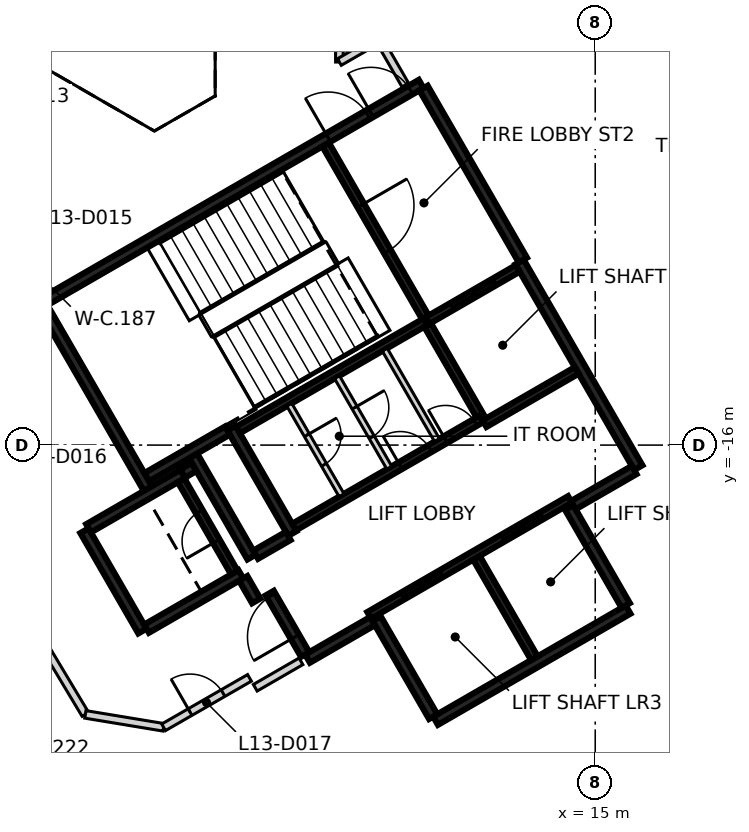
"""IFC4 building model, lengths in metres.
Left out: names, types, materials, properties, quantities, classifications, styles, units other than length and angle.
Written with IfcOpenShell. Run it as: python <this file> out.ifc"""

import sys

from ifc_helpers import new_model, si_unit, direction, frame, frame_2d, origin, place, context, subcontext, project, spatial, rectangle, extrude, element, fill, save


model = new_model("IFC4")
c1 = context("Model", 3, precision=1e-05, world=origin(), true_north=direction((0.0, 1.0)))
c2 = subcontext(c1, "Body", "Model", "MODEL_VIEW")
j1 = project(units=[si_unit("LENGTHUNIT", "METRE"), si_unit("PLANEANGLEUNIT", "RADIAN")], contexts=[c1])
p1 = place(None, origin())
s1 = spatial("IfcSite", under=j1, at=p1, CompositionType="ELEMENT")
p2 = place(p1, origin())
s2 = spatial("IfcBuilding", under=s1, at=p2, CompositionType="ELEMENT")
p3 = place(p2, frame((0.0, 0.0, 60.2)))
s3 = spatial("IfcBuildingStorey", under=s2, at=p3, CompositionType="ELEMENT", Elevation=60.2)
p4 = place(p3, frame((0.417, -12.273, 0.0), z_axis=(0.0, 0.0, 1.0), x_axis=(0.866021906294, 0.500006057782, 0.0)))
e1 = element("IfcWall", 1, at=p4, inside=s3, PredefinedType="SHEAR", context=c2, shape_type="SweptSolid", body=[
    extrude(rectangle(XDim=11.55, YDim=0.25, at=frame_2d((5.775, 0.0))), origin(), (0.0, 0.0, 1.0), 3.125),
])
p5 = place(p4, frame((10.025, 0.0, 0.0)))
e2 = element("IfcOpeningElement", 2, at=p5, cuts=e1, PredefinedType="OPENING", context=c2, shape_type="SweptSolid", body=[
    extrude(rectangle(XDim=1.2, YDim=2.1, at=frame_2d((0.6, 1.05))), frame((0.0, 0.135, 0.0), z_axis=(0.0, -1.0, 0.0), x_axis=(1.0, 0.0, 0.0)), (0.0, 0.0, 1.0), 0.27),
])
p6 = place(p4, frame((8.725, 0.0, 0.0)))
e3 = element("IfcOpeningElement", 3, at=p6, cuts=e1, PredefinedType="OPENING", context=c2, shape_type="SweptSolid", body=[
    extrude(rectangle(XDim=1.2, YDim=2.1, at=frame_2d((0.6, 1.05))), frame((0.0, 0.135, 0.0), z_axis=(0.0, -1.0, 0.0), x_axis=(1.0, 0.0, 0.0)), (0.0, 0.0, 1.0), 0.27),
])
p7 = place(p3, frame((13.008, -11.181, 0.0), z_axis=(0.0, 0.0, 1.0), x_axis=(0.500004234368, -0.866022959057, 0.0)))
e4 = element("IfcWall", 4, at=p7, inside=s3, PredefinedType="SHEAR", context=c2, shape_type="SweptSolid", body=[
    extrude(rectangle(XDim=6.25, YDim=0.25, at=frame_2d((3.125, 0.0))), origin(), (0.0, 0.0, 1.0), 3.125),
])
p8 = place(p3, frame((15.865, -20.328, 0.0), z_axis=(0.0, 0.0, 1.0), x_axis=(-0.86602852612, -0.499994591916, 0.0)))
e5 = element("IfcWall", 5, at=p8, inside=s3, PredefinedType="SHEAR", context=c2, shape_type="SweptSolid", body=[
    extrude(rectangle(XDim=5.85, YDim=0.25, at=frame_2d((2.925, 0.0))), origin(), (0.0, 0.0, 1.0), 3.125),
])
p9 = place(p3, frame((3.235, -17.153, 0.0), z_axis=(0.0, 0.0, 1.0), x_axis=(-0.500008851346, 0.866020293397, 0.0)))
e6 = element("IfcWall", 6, at=p9, inside=s3, PredefinedType="SHEAR", context=c2, shape_type="SweptSolid", body=[
    extrude(rectangle(XDim=5.51, YDim=0.25, at=frame_2d((2.755, 0.0))), origin(), (0.0, 0.0, 1.0), 3.125),
])
p10 = place(p3, frame((10.483, -6.606, 0.0), z_axis=(0.0, 0.0, 1.0), x_axis=(0.49999885962, -0.866026062182, 0.0)))
e7 = element("IfcWall", 7, at=p10, inside=s3, PredefinedType="SHEAR", context=c2, shape_type="SweptSolid", body=[
    extrude(rectangle(XDim=5.225, YDim=0.25, at=frame_2d((2.612, 0.0))), origin(), (0.0, 0.0, 1.0), 3.125),
])
p11 = place(p3, frame((7.031, -18.327, 0.0), z_axis=(0.0, 0.0, 1.0), x_axis=(-0.499971222258, 0.866042017984, 0.0)))
e8 = element("IfcWall", 8, at=p11, inside=s3, PredefinedType="SHEAR", context=c2, shape_type="SweptSolid", body=[
    extrude(rectangle(XDim=3.2, YDim=0.25, at=frame_2d((1.6, 0.0))), origin(), (0.0, 0.0, 1.0), 3.125),
])
for number, where, z_axis, x_axis in (
    (9, (14.315, -17.644, 0.0), (0.0, 0.0, 1.0), (0.5, -0.866, 0.0)),
    (10, (10.736, -23.145, 0.0), (0.0, 0.0, 1.0), (-0.5, 0.866, 0.0)),
):
    element("IfcWall", number, at=place(p3, frame(where, z_axis=z_axis, x_axis=x_axis)), inside=s3, PredefinedType="SHEAR", context=c2, shape_type="SweptSolid", body=[
        extrude(rectangle(XDim=2.974, YDim=0.25, at=frame_2d((1.487, 0.0))), origin(), (0.0, 0.0, 1.0), 3.125),
    ])
p12 = place(p3, frame((3.085, -20.894, 0.0), z_axis=(0.0, 0.0, 1.0), x_axis=(-0.499978833458, 0.866037623948, 0.0)))
e11 = element("IfcWall", 11, at=p12, inside=s3, PredefinedType="SHEAR", context=c2, shape_type="SweptSolid", body=[
    extrude(rectangle(XDim=3.05, YDim=0.25, at=frame_2d((1.525, 0.0))), origin(), (0.0, 0.0, 1.0), 3.125),
])
p13 = place(p3, frame((1.669, -18.19, 0.0), z_axis=(0.0, 0.0, 1.0), x_axis=(0.866042235819, 0.499970844928, 0.0)))
e12 = element("IfcWall", 12, at=p13, inside=s3, PredefinedType="SHEAR", context=c2, shape_type="SweptSolid", body=[
    extrude(rectangle(XDim=2.865, YDim=0.25, at=frame_2d((1.432, 0.0))), origin(), (0.0, 0.0, 1.0), 3.125),
])
p14 = place(p3, frame((5.675, -19.399, 0.0), z_axis=(0.0, 0.0, 1.0), x_axis=(-0.866026637627, -0.499997862916, 0.0)))
e13 = element("IfcWall", 13, at=p14, inside=s3, PredefinedType="SHEAR", context=c2, shape_type="SweptSolid", body=[
    extrude(rectangle(XDim=2.865, YDim=0.25, at=frame_2d((1.432, 0.0))), origin(), (0.0, 0.0, 1.0), 3.125),
])
p15 = place(p3, frame((4.414, -16.276, 0.0), z_axis=(0.0, 0.0, 1.0), x_axis=(0.500003324108, -0.866023484601, 0.0)))
e14 = element("IfcWall", 14, at=p15, inside=s3, PredefinedType="SHEAR", context=c2, shape_type="SweptSolid", body=[
    extrude(rectangle(XDim=3.085, YDim=0.25, at=frame_2d((1.542, 0.0))), origin(), (0.0, 0.0, 1.0), 3.125),
])
p16 = place(p3, frame((5.322, -15.619, 0.0), z_axis=(0.0, 0.0, 1.0), x_axis=(-0.866026229868, -0.499998569178, 0.0)))
e15 = element("IfcWall", 15, at=p16, inside=s3, PredefinedType="SHEAR", context=c2, shape_type="SweptSolid", body=[
    extrude(rectangle(XDim=2.449, YDim=0.25, at=frame_2d((1.225, 0.0))), origin(), (0.0, 0.0, 1.0), 3.125),
])
p17 = place(p3, frame((9.14, -20.631, 0.0), z_axis=(0.0, 0.0, 1.0), x_axis=(-0.866043531843, -0.499968599967, 0.0)))
e16 = element("IfcWall", 16, at=p17, inside=s3, PredefinedType="SHEAR", context=c2, shape_type="SweptSolid", body=[
    extrude(rectangle(XDim=1.975, YDim=0.25, at=frame_2d((0.987, 0.0))), origin(), (0.0, 0.0, 1.0), 3.125),
])
p18 = place(p3, frame((16.025, -16.656, 0.0), z_axis=(0.0, 0.0, 1.0), x_axis=(-0.866016279763, -0.500015802937, 0.0)))
e17 = element("IfcWall", 17, at=p18, inside=s3, PredefinedType="SHEAR", context=c2, shape_type="SweptSolid", body=[
    extrude(rectangle(XDim=1.849, YDim=0.25, at=frame_2d((0.925, 0.0))), origin(), (0.0, 0.0, 1.0), 3.125),
])
p19 = place(p3, frame((7.367, -21.51, 0.0), z_axis=(0.0, 0.0, 1.0), x_axis=(-0.499983108224, 0.866035156036, 0.0)))
e18 = element("IfcWall", 18, at=p19, inside=s3, PredefinedType="SHEAR", context=c2, shape_type="SweptSolid", body=[
    extrude(rectangle(XDim=1.865, YDim=0.25, at=frame_2d((0.932, 0.0))), origin(), (0.0, 0.0, 1.0), 3.125),
])
p20 = place(p19, frame((0.535, 0.0, 0.0)))
e19 = element("IfcOpeningElement", 19, at=p20, cuts=e18, PredefinedType="OPENING", context=c2, shape_type="SweptSolid", body=[
    extrude(rectangle(XDim=1.25, YDim=2.1, at=frame_2d((0.625, 1.05))), frame((0.0, 0.135, 0.0), z_axis=(0.0, -1.0, 0.0), x_axis=(1.0, 0.0, 0.0)), (0.0, 0.0, 1.0), 0.27),
])
p21 = place(p3, frame((6.065, -18.885, 0.0), z_axis=(0.0, 0.0, 1.0), x_axis=(0.866017078145, 0.500014420154, 0.0)))
e20 = element("IfcWall", 20, at=p21, inside=s3, PredefinedType="SHEAR", context=c2, shape_type="SweptSolid", body=[
    extrude(rectangle(XDim=0.989, YDim=0.25, at=frame_2d((0.495, 0.0))), origin(), (0.0, 0.0, 1.0), 3.125),
])
p22 = place(p3, frame((6.08, -20.1, 0.0), z_axis=(0.0, 0.0, 1.0), x_axis=(-0.500051773299, 0.865995510393, 0.0)))
e21 = element("IfcWall", 21, at=p22, inside=s3, PredefinedType="SHEAR", context=c2, shape_type="SweptSolid", body=[
    extrude(rectangle(XDim=0.685, YDim=0.25, at=frame_2d((0.342, 0.0))), origin(), (0.0, 0.0, 1.0), 3.125),
])
p23 = place(p3, frame((4.145, -16.749, 0.0), z_axis=(0.0, 0.0, 1.0), x_axis=(0.866185586049, 0.49972245349, 0.0)))
e22 = element("IfcWall", 22, at=p23, inside=s3, PredefinedType="SHEAR", context=c2, shape_type="SweptSolid", body=[
    extrude(rectangle(XDim=0.344, YDim=0.25, at=frame_2d((0.172, 0.0))), origin(), (0.0, 0.0, 1.0), 3.125),
])
p24 = place(p3, frame((9.052, -20.48, 0.0), z_axis=(0.0, 0.0, 1.0), x_axis=(0.866030299012, 0.499991521122, 0.0)))
e23 = element("IfcWall", 23, at=p24, inside=s3, PredefinedType="SHEAR", context=c2, shape_type="SweptSolid", body=[
    extrude(rectangle(XDim=6.1, YDim=0.2, at=frame_2d((3.05, 0.0))), origin(), (0.0, 0.0, 1.0), 3.125),
])
p25 = place(p24, frame((1.0, 0.0, 0.0)))
e24 = element("IfcOpeningElement", 24, at=p25, cuts=e23, PredefinedType="OPENING", context=c2, shape_type="SweptSolid", body=[
    extrude(rectangle(XDim=1.2, YDim=2.1, at=frame_2d((0.6, 1.05))), frame((0.0, 0.11, 0.0), z_axis=(0.0, -1.0, 0.0), x_axis=(1.0, 0.0, 0.0)), (0.0, 0.0, 1.0), 0.22),
])
p26 = place(p24, frame((4.05, 0.0, 0.0)))
e25 = element("IfcOpeningElement", 25, at=p26, cuts=e23, PredefinedType="OPENING", context=c2, shape_type="SweptSolid", body=[
    extrude(rectangle(XDim=1.2, YDim=2.1, at=frame_2d((0.6, 1.05))), frame((0.0, 0.11, 0.0), z_axis=(0.0, -1.0, 0.0), x_axis=(1.0, 0.0, 0.0)), (0.0, 0.0, 1.0), 0.22),
])
p27 = place(p3, frame((10.538, -12.752, 0.0), z_axis=(0.0, 0.0, 1.0), x_axis=(-0.866038630372, -0.499977090179, 0.0)))
e26 = element("IfcWall", 26, at=p27, inside=s3, PredefinedType="SHEAR", context=c2, shape_type="SweptSolid", body=[
    extrude(rectangle(XDim=5.699, YDim=0.2, at=frame_2d((2.85, 0.0))), origin(), (0.0, 0.0, 1.0), 3.125),
])
p28 = place(p3, frame((7.077, -18.156, 0.0), z_axis=(0.0, 0.0, 1.0), x_axis=(0.866038630372, 0.499977090179, 0.0)))
e27 = element("IfcWall", 27, at=p28, inside=s3, PredefinedType="SHEAR", context=c2, shape_type="SweptSolid", body=[
    extrude(rectangle(XDim=5.699, YDim=0.2, at=frame_2d((2.85, 0.0))), origin(), (0.0, 0.0, 1.0), 3.125),
])
p29 = place(p28, frame((3.224, 0.0, 0.0)))
e28 = element("IfcOpeningElement", 28, at=p29, cuts=e27, PredefinedType="OPENING", context=c2, shape_type="SweptSolid", body=[
    extrude(rectangle(XDim=0.9, YDim=2.1, at=frame_2d((0.45, 1.05))), frame((0.0, 0.11, 0.0), z_axis=(0.0, -1.0, 0.0), x_axis=(1.0, 0.0, 0.0)), (0.0, 0.0, 1.0), 0.22),
])
p30 = place(p28, frame((4.599, 0.0, 0.0)))
e29 = element("IfcOpeningElement", 29, at=p30, cuts=e27, PredefinedType="OPENING", context=c2, shape_type="SweptSolid", body=[
    extrude(rectangle(XDim=0.9, YDim=2.1, at=frame_2d((0.45, 1.05))), frame((0.0, 0.11, 0.0), z_axis=(0.0, -1.0, 0.0), x_axis=(1.0, 0.0, 0.0)), (0.0, 0.0, 1.0), 0.22),
])
p31 = place(p3, frame((7.906, -8.094, 0.0), z_axis=(0.0, 0.0, 1.0), x_axis=(0.500024287448, -0.866011380966, 0.0)))
e30 = element("IfcWall", 30, at=p31, inside=s3, PredefinedType="SHEAR", context=c2, shape_type="SweptSolid", body=[
    extrude(rectangle(XDim=5.251, YDim=0.2, at=frame_2d((2.625, 0.0))), origin(), (0.0, 0.0, 1.0), 3.125),
])
p32 = place(p31, frame((1.849, 0.0, 0.0)))
e31 = element("IfcOpeningElement", 31, at=p32, cuts=e30, PredefinedType="OPENING", context=c2, shape_type="SweptSolid", body=[
    extrude(rectangle(XDim=1.4, YDim=2.1, at=frame_2d((0.7, 1.05))), frame((0.0, 0.11, 0.0), z_axis=(0.0, -1.0, 0.0), x_axis=(1.0, 0.0, 0.0)), (0.0, 0.0, 1.0), 0.22),
])
p33 = place(p3, frame((11.875, -18.967, 0.0), z_axis=(0.0, 0.0, 1.0), x_axis=(0.49998131003, -0.866036194175, 0.0)))
e32 = element("IfcWall", 32, at=p33, inside=s3, PredefinedType="SHEAR", context=c2, shape_type="SweptSolid", body=[
    extrude(rectangle(XDim=3.048, YDim=0.2, at=frame_2d((1.524, 0.0))), origin(), (0.0, 0.0, 1.0), 3.125),
])
p34 = place(p3, frame((5.503, -19.352, 0.0), z_axis=(0.0, 0.0, 1.0), x_axis=(-0.499986818241, 0.866033014143, 0.0)))
e33 = element("IfcWall", 33, at=p34, inside=s3, PredefinedType="SHEAR", context=c2, shape_type="SweptSolid", body=[
    extrude(rectangle(XDim=2.798, YDim=0.2, at=frame_2d((1.399, 0.0))), origin(), (0.0, 0.0, 1.0), 3.125),
])
p35 = place(p34, frame((0.949, 0.0, 0.0)))
e34 = element("IfcOpeningElement", 34, at=p35, cuts=e33, PredefinedType="OPENING", context=c2, shape_type="SweptSolid", body=[
    extrude(rectangle(XDim=0.9, YDim=2.1, at=frame_2d((0.45, 1.05))), frame((0.0, 0.11, 0.0), z_axis=(0.0, -1.0, 0.0), x_axis=(1.0, 0.0, 0.0)), (0.0, 0.0, 1.0), 0.22),
])
p36 = place(p3, frame((11.963, -15.22, 0.0), z_axis=(0.0, 0.0, 1.0), x_axis=(-0.500034990121, 0.866005201286, 0.0)))
e35 = element("IfcWall", 35, at=p36, inside=s3, PredefinedType="SHEAR", context=c2, shape_type="SweptSolid", body=[
    extrude(rectangle(XDim=2.75, YDim=0.2, at=frame_2d((1.375, 0.0))), origin(), (0.0, 0.0, 1.0), 3.125),
])
p37 = place(p3, frame((10.587, -12.723, 0.0), z_axis=(0.0, 0.0, 1.0), x_axis=(0.866037306777, 0.499979382845, 0.0)))
e36 = element("IfcWall", 36, at=p37, inside=s3, PredefinedType="SHEAR", context=c2, shape_type="SweptSolid", body=[
    extrude(rectangle(XDim=2.742, YDim=0.2, at=frame_2d((1.371, 0.0))), origin(), (0.0, 0.0, 1.0), 3.125),
])
p38 = place(p37, frame((0.743, 0.0, 0.0)))
e37 = element("IfcOpeningElement", 37, at=p38, cuts=e36, PredefinedType="OPENING", context=c2, shape_type="SweptSolid", body=[
    extrude(rectangle(XDim=1.3, YDim=2.1, at=frame_2d((0.65, 1.05))), frame((0.0, 0.11, 0.0), z_axis=(0.0, -1.0, 0.0), x_axis=(1.0, 0.0, 0.0)), (0.0, 0.0, 1.0), 0.22),
])
p39 = place(p3, frame((14.512, -14.037, 0.0), z_axis=(0.0, 0.0, 1.0), x_axis=(-0.866044696403, -0.499966582715, 0.0)))
e38 = element("IfcWall", 38, at=p39, inside=s3, PredefinedType="SHEAR", context=c2, shape_type="SweptSolid", body=[
    extrude(rectangle(XDim=2.799, YDim=0.2, at=frame_2d((1.399, 0.0))), origin(), (0.0, 0.0, 1.0), 3.125),
])
p40 = place(p3, frame((8.207, -14.214, 0.0), z_axis=(0.0, 0.0, 1.0), x_axis=(0.50002746344, -0.86600954718, 0.0)))
e39 = element("IfcWall", 39, at=p40, inside=s3, PredefinedType="PARTITIONING", context=c2, shape_type="SweptSolid", body=[
    extrude(rectangle(XDim=2.748, YDim=0.15, at=frame_2d((1.374, 0.0))), origin(), (0.0, 0.0, 1.0), 3.125),
])
p41 = place(p40, frame((0.924, 0.0, 0.0)))
e40 = element("IfcOpeningElement", 40, at=p41, cuts=e39, PredefinedType="OPENING", context=c2, shape_type="SweptSolid", body=[
    extrude(rectangle(XDim=0.9, YDim=2.1, at=frame_2d((0.45, 1.05))), frame((0.0, 0.085, 0.0), z_axis=(0.0, -1.0, 0.0), x_axis=(1.0, 0.0, 0.0)), (0.0, 0.0, 1.0), 0.17),
])
p42 = place(p3, frame((9.462, -13.489, 0.0), z_axis=(0.0, 0.0, 1.0), x_axis=(0.499988999718, -0.866031754707, 0.0)))
e41 = element("IfcWall", 41, at=p42, inside=s3, PredefinedType="PARTITIONING", context=c2, shape_type="SweptSolid", body=[
    extrude(rectangle(XDim=2.749, YDim=0.15, at=frame_2d((1.374, 0.0))), origin(), (0.0, 0.0, 1.0), 3.125),
])
p43 = place(p3, frame((6.951, -14.939, 0.0), z_axis=(0.0, 0.0, 1.0), x_axis=(0.499988999718, -0.866031754707, 0.0)))
e42 = element("IfcWall", 42, at=p43, inside=s3, PredefinedType="PARTITIONING", context=c2, shape_type="SweptSolid", body=[
    extrude(rectangle(XDim=2.749, YDim=0.15, at=frame_2d((1.374, 0.0))), origin(), (0.0, 0.0, 1.0), 3.125),
])
p44 = place(p43, frame((0.924, 0.0, 0.0)))
e43 = element("IfcOpeningElement", 43, at=p44, cuts=e42, PredefinedType="OPENING", context=c2, shape_type="SweptSolid", body=[
    extrude(rectangle(XDim=0.9, YDim=2.1, at=frame_2d((0.45, 1.05))), frame((0.0, 0.085, 0.0), z_axis=(0.0, -1.0, 0.0), x_axis=(1.0, 0.0, 0.0)), (0.0, 0.0, 1.0), 0.17),
])
p45 = place(p3, frame((-0.858, -19.017, 0.0), z_axis=(0.0, 0.0, 1.0), x_axis=(0.514647068805, -0.857402119528, 0.0)))
e44 = element("IfcWall", 44, at=p45, inside=s3, PredefinedType="PARTITIONING", context=c2, shape_type="SweptSolid", body=[
    extrude(rectangle(XDim=4.745, YDim=0.2, at=frame_2d((2.373, 0.0))), origin(), (0.0, 0.0, 1.0), 3.125),
])
p46 = place(p3, frame((1.584, -23.086, 0.0), z_axis=(0.0, 0.0, 1.0), x_axis=(0.986633159246, -0.162957077405, 0.0)))
e45 = element("IfcWall", 45, at=p46, inside=s3, PredefinedType="PARTITIONING", context=c2, shape_type="SweptSolid", body=[
    extrude(rectangle(XDim=2.087, YDim=0.2, at=frame_2d((1.043, 0.0))), origin(), (0.0, 0.0, 1.0), 3.125),
])
p47 = place(p3, frame((3.643, -23.426, 0.0), z_axis=(0.0, 0.0, 1.0), x_axis=(0.866654350985, 0.498909045738, 0.0)))
e46 = element("IfcWall", 46, at=p47, inside=s3, PredefinedType="PARTITIONING", context=c2, shape_type="SweptSolid", body=[
    extrude(rectangle(XDim=2.608, YDim=0.2, at=frame_2d((1.304, 0.0))), origin(), (0.0, 0.0, 1.0), 3.125),
])
p48 = place(p47, frame((0.804, 0.0, 0.0)))
e47 = element("IfcOpeningElement", 47, at=p48, cuts=e46, PredefinedType="OPENING", context=c2, shape_type="SweptSolid", body=[
    extrude(rectangle(XDim=1.0, YDim=2.1, at=frame_2d((0.5, 1.05))), frame((0.0, 0.11, 0.0), z_axis=(0.0, -1.0, 0.0), x_axis=(1.0, 0.0, 0.0)), (0.0, 0.0, 1.0), 0.22),
])
p49 = place(p3, frame((6.054, -22.385, 0.0), z_axis=(0.0, 0.0, 1.0), x_axis=(0.86593101922, 0.500163443238, 0.0)))
e48 = element("IfcWall", 48, at=p49, inside=s3, PredefinedType="PARTITIONING", context=c2, shape_type="SweptSolid", body=[
    extrude(rectangle(XDim=1.39, YDim=0.2, at=frame_2d((0.695, 0.0))), origin(), (0.0, 0.0, 1.0), 3.125),
])
p50 = place(p3, frame((8.268, -5.921, 0.0), z_axis=(0.0, 0.0, 1.0), x_axis=(0.0, 1.0, 0.0)))
e49 = element("IfcWall", 49, at=p50, inside=s3, PredefinedType="PARTITIONING", context=c2, shape_type="SweptSolid", body=[
    extrude(rectangle(XDim=1.2, YDim=0.2, at=frame_2d((0.6, 0.0))), origin(), (0.0, 0.0, 1.0), 3.125),
])
p51 = place(p3, frame((8.268, -5.921, 0.0), z_axis=(0.0, 0.0, 1.0), x_axis=(0.866344856625, 0.499446282797, 0.0)))
e50 = element("IfcWall", 50, at=p51, inside=s3, PredefinedType="PARTITIONING", context=c2, shape_type="SweptSolid", body=[
    extrude(rectangle(XDim=1.199, YDim=0.2, at=frame_2d((0.6, 0.0))), origin(), (0.0, 0.0, 1.0), 3.125),
])
p52 = place(p3, frame((9.307, -5.322, 0.0), z_axis=(0.0, 0.0, 1.0), x_axis=(0.500295157811, -0.865854927266, 0.0)))
e51 = element("IfcWall", 51, at=p52, inside=s3, PredefinedType="PARTITIONING", context=c2, shape_type="SweptSolid", body=[
    extrude(rectangle(XDim=1.39, YDim=0.2, at=frame_2d((0.695, 0.0))), origin(), (0.0, 0.0, 1.0), 3.125),
])
p53 = place(p38, origin())
e52 = element("IfcDoor", 52, at=p53, inside=s3, OperationType="SLIDING_TO_RIGHT", PredefinedType="DOOR", context=c2, shape_type="SweptSolid", body=[
    extrude(rectangle(XDim=1.3, YDim=2.1, at=frame_2d((0.65, 1.05))), frame((0.0, 0.025, 0.0), z_axis=(0.0, -1.0, 0.0), x_axis=(1.0, 0.0, 0.0)), (0.0, 0.0, 1.0), 0.05),
])
fill(e37, e52)
p54 = place(p25, origin())
e53 = element("IfcDoor", 53, at=p54, inside=s3, OperationType="DOUBLE_DOOR_SLIDING", PredefinedType="DOOR", context=c2, shape_type="SweptSolid", body=[
    extrude(rectangle(XDim=1.2, YDim=2.1, at=frame_2d((0.6, 1.05))), frame((0.0, 0.025, 0.0), z_axis=(0.0, -1.0, 0.0), x_axis=(1.0, 0.0, 0.0)), (0.0, 0.0, 1.0), 0.05),
])
fill(e24, e53)
p55 = place(p26, origin())
e54 = element("IfcDoor", 54, at=p55, inside=s3, OperationType="DOUBLE_DOOR_SLIDING", PredefinedType="DOOR", context=c2, shape_type="SweptSolid", body=[
    extrude(rectangle(XDim=1.2, YDim=2.1, at=frame_2d((0.6, 1.05))), frame((0.0, 0.025, 0.0), z_axis=(0.0, -1.0, 0.0), x_axis=(1.0, 0.0, 0.0)), (0.0, 0.0, 1.0), 0.05),
])
fill(e25, e54)
p56 = place(p20, origin())
e55 = element("IfcDoor", 55, at=p56, inside=s3, OperationType="SINGLE_SWING_LEFT", PredefinedType="DOOR", context=c2, shape_type="SweptSolid", body=[
    extrude(rectangle(XDim=1.25, YDim=2.1, at=frame_2d((0.625, 1.05))), frame((0.0, 0.025, 0.0), z_axis=(0.0, -1.0, 0.0), x_axis=(1.0, 0.0, 0.0)), (0.0, 0.0, 1.0), 0.05),
])
fill(e19, e55)
p57 = place(p5, origin())
e56 = element("IfcDoor", 56, at=p57, inside=s3, OperationType="SINGLE_SWING_LEFT", PredefinedType="DOOR", context=c2, shape_type="SweptSolid", body=[
    extrude(rectangle(XDim=1.2, YDim=2.1, at=frame_2d((0.6, 1.05))), frame((0.0, 0.025, 0.0), z_axis=(0.0, -1.0, 0.0), x_axis=(1.0, 0.0, 0.0)), (0.0, 0.0, 1.0), 0.05),
])
fill(e2, e56)
p58 = place(p6, origin())
e57 = element("IfcDoor", 57, at=p58, inside=s3, OperationType="SINGLE_SWING_RIGHT", PredefinedType="DOOR", context=c2, shape_type="SweptSolid", body=[
    extrude(rectangle(XDim=1.2, YDim=2.1, at=frame_2d((0.6, 1.05))), frame((0.0, 0.025, 0.0), z_axis=(0.0, -1.0, 0.0), x_axis=(1.0, 0.0, 0.0)), (0.0, 0.0, 1.0), 0.05),
])
fill(e3, e57)
p59 = place(p32, origin())
e58 = element("IfcDoor", 58, at=p59, inside=s3, OperationType="SINGLE_SWING_RIGHT", PredefinedType="DOOR", context=c2, shape_type="SweptSolid", body=[
    extrude(rectangle(XDim=1.4, YDim=2.1, at=frame_2d((0.7, 1.05))), frame((0.0, 0.025, 0.0), z_axis=(0.0, -1.0, 0.0), x_axis=(1.0, 0.0, 0.0)), (0.0, 0.0, 1.0), 0.05),
])
fill(e31, e58)
p60 = place(p29, origin())
e59 = element("IfcDoor", 59, at=p60, inside=s3, OperationType="SINGLE_SWING_LEFT", PredefinedType="DOOR", context=c2, shape_type="SweptSolid", body=[
    extrude(rectangle(XDim=0.9, YDim=2.1, at=frame_2d((0.45, 1.05))), frame((0.0, 0.025, 0.0), z_axis=(0.0, -1.0, 0.0), x_axis=(1.0, 0.0, 0.0)), (0.0, 0.0, 1.0), 0.05),
])
fill(e28, e59)
p61 = place(p30, origin())
e60 = element("IfcDoor", 60, at=p61, inside=s3, OperationType="SINGLE_SWING_RIGHT", PredefinedType="DOOR", context=c2, shape_type="SweptSolid", body=[
    extrude(rectangle(XDim=0.9, YDim=2.1, at=frame_2d((0.45, 1.05))), frame((0.0, 0.025, 0.0), z_axis=(0.0, -1.0, 0.0), x_axis=(1.0, 0.0, 0.0)), (0.0, 0.0, 1.0), 0.05),
])
fill(e29, e60)
p62 = place(p35, origin())
e61 = element("IfcDoor", 61, at=p62, inside=s3, OperationType="SINGLE_SWING_LEFT", PredefinedType="DOOR", context=c2, shape_type="SweptSolid", body=[
    extrude(rectangle(XDim=0.9, YDim=2.1, at=frame_2d((0.45, 1.05))), frame((0.0, 0.025, 0.0), z_axis=(0.0, -1.0, 0.0), x_axis=(1.0, 0.0, 0.0)), (0.0, 0.0, 1.0), 0.05),
])
fill(e34, e61)
p63 = place(p41, origin())
e62 = element("IfcDoor", 62, at=p63, inside=s3, OperationType="SINGLE_SWING_RIGHT", PredefinedType="DOOR", context=c2, shape_type="SweptSolid", body=[
    extrude(rectangle(XDim=0.9, YDim=2.1, at=frame_2d((0.45, 1.05))), frame((0.0, 0.025, 0.0), z_axis=(0.0, -1.0, 0.0), x_axis=(1.0, 0.0, 0.0)), (0.0, 0.0, 1.0), 0.05),
])
fill(e40, e62)
p64 = place(p44, origin())
e63 = element("IfcDoor", 63, at=p64, inside=s3, OperationType="SINGLE_SWING_LEFT", PredefinedType="DOOR", context=c2, shape_type="SweptSolid", body=[
    extrude(rectangle(XDim=0.9, YDim=2.1, at=frame_2d((0.45, 1.05))), frame((0.0, 0.025, 0.0), z_axis=(0.0, -1.0, 0.0), x_axis=(1.0, 0.0, 0.0)), (0.0, 0.0, 1.0), 0.05),
])
fill(e43, e63)
p65 = place(p48, frame((1.0, 0.0, 0.0), z_axis=(0.0, 0.0, 1.0), x_axis=(-1.0, 0.0, 0.0)))
e64 = element("IfcDoor", 64, at=p65, inside=s3, OperationType="SINGLE_SWING_LEFT", PredefinedType="DOOR", context=c2, shape_type="SweptSolid", body=[
    extrude(rectangle(XDim=1.0, YDim=2.1, at=frame_2d((0.5, 1.05))), frame((0.0, 0.025, 0.0), z_axis=(0.0, -1.0, 0.0), x_axis=(1.0, 0.0, 0.0)), (0.0, 0.0, 1.0), 0.05),
])
fill(e47, e64)
save(model, sys.argv[1])
